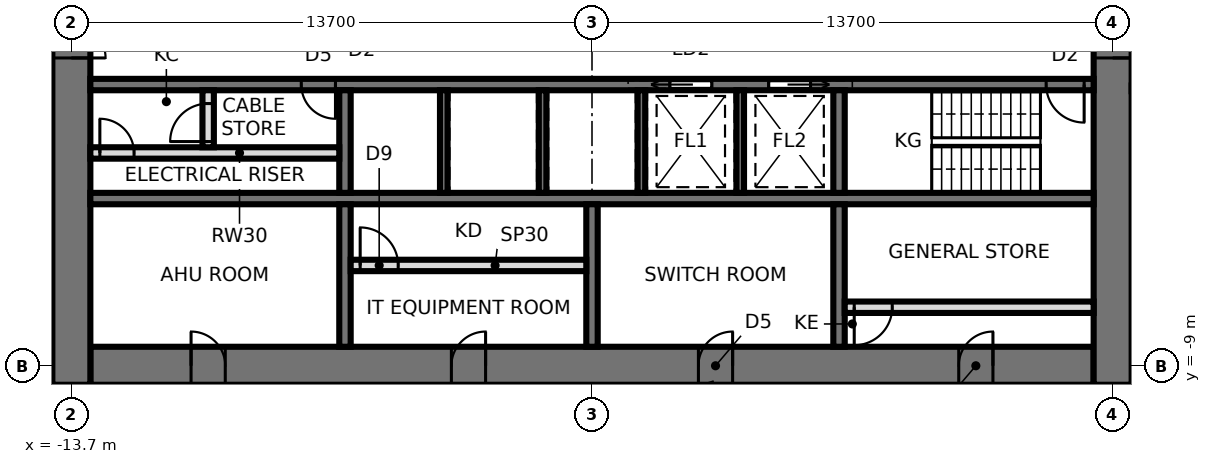
"""IFC4 building model, lengths in metres.
Left out: names, types, materials, properties, quantities, classifications, styles, units other than length and angle.
Written with IfcOpenShell. Run it as: python <this file> out.ifc"""

import sys

from ifc_helpers import new_model, si_unit, direction, frame, frame_2d, origin, place, context, subcontext, project, spatial, rectangle, extrude, element, fill, save


model = new_model("IFC4")
c1 = context("Model", 3, precision=1e-05, world=origin(), true_north=direction((0.0, 1.0)))
c2 = subcontext(c1, "Body", "Model", "MODEL_VIEW")
j1 = project(units=[si_unit("LENGTHUNIT", "METRE"), si_unit("PLANEANGLEUNIT", "RADIAN")], contexts=[c1])
p1 = place(None, origin())
s1 = spatial("IfcSite", under=j1, at=p1, CompositionType="ELEMENT")
p2 = place(p1, origin())
s2 = spatial("IfcBuilding", under=s1, at=p2, CompositionType="ELEMENT")
p3 = place(p2, frame((0.0, 0.0, 23.8)))
s3 = spatial("IfcBuildingStorey", under=s2, at=p3, CompositionType="ELEMENT", Elevation=23.8)
p4 = place(p3, frame((-13.2, -9.0, 0.0), z_axis=(0.0, 0.0, 1.0), x_axis=(1.0, 0.0, 0.0)))
e1 = element("IfcWall", 1, at=p4, inside=s3, PredefinedType="SHEAR", context=c2, shape_type="SweptSolid", body=[
    extrude(rectangle(XDim=26.4, YDim=1.0, at=frame_2d((13.2, 0.0))), origin(), (0.0, 0.0, 1.0), 4.2),
])
p5 = place(p4, frame((2.65, 0.0, 0.0)))
e2 = element("IfcOpeningElement", 2, at=p5, cuts=e1, PredefinedType="OPENING", context=c2, shape_type="SweptSolid", body=[
    extrude(rectangle(XDim=0.9, YDim=2.1, at=frame_2d((0.45, 1.05))), frame((0.0, 0.51, 0.0), z_axis=(0.0, -1.0, 0.0), x_axis=(1.0, 0.0, 0.0)), (0.0, 0.0, 1.0), 1.02),
])
p6 = place(p4, frame((9.5, 0.0, 0.0)))
e3 = element("IfcOpeningElement", 3, at=p6, cuts=e1, PredefinedType="OPENING", context=c2, shape_type="SweptSolid", body=[
    extrude(rectangle(XDim=0.9, YDim=2.1, at=frame_2d((0.45, 1.05))), frame((0.0, 0.51, 0.0), z_axis=(0.0, -1.0, 0.0), x_axis=(1.0, 0.0, 0.0)), (0.0, 0.0, 1.0), 1.02),
])
p7 = place(p4, frame((16.0, 0.0, 0.0)))
e4 = element("IfcOpeningElement", 4, at=p7, cuts=e1, PredefinedType="OPENING", context=c2, shape_type="SweptSolid", body=[
    extrude(rectangle(XDim=0.9, YDim=2.1, at=frame_2d((0.45, 1.05))), frame((0.0, 0.51, 0.0), z_axis=(0.0, -1.0, 0.0), x_axis=(1.0, 0.0, 0.0)), (0.0, 0.0, 1.0), 1.02),
])
p8 = place(p4, frame((22.85, 0.0, 0.0)))
e5 = element("IfcOpeningElement", 5, at=p8, cuts=e1, PredefinedType="OPENING", context=c2, shape_type="SweptSolid", body=[
    extrude(rectangle(XDim=0.9, YDim=2.1, at=frame_2d((0.45, 1.05))), frame((0.0, 0.51, 0.0), z_axis=(0.0, -1.0, 0.0), x_axis=(1.0, 0.0, 0.0)), (0.0, 0.0, 1.0), 1.02),
])
p9 = place(p3, frame((13.7, -9.5, 0.0), z_axis=(0.0, 0.0, 1.0), x_axis=(0.0, 1.0, 0.0)))
e6 = element("IfcWall", 6, at=p9, inside=s3, PredefinedType="SHEAR", context=c2, shape_type="SweptSolid", body=[
    extrude(rectangle(XDim=19.0, YDim=1.0, at=frame_2d((9.5, 0.0))), origin(), (0.0, 0.0, 1.0), 4.2),
])
p10 = place(p9, frame((8.6, 0.0, 0.0)))
e7 = element("IfcOpeningElement", 7, at=p10, cuts=e6, PredefinedType="OPENING", context=c2, shape_type="SweptSolid", body=[
    extrude(rectangle(XDim=1.8, YDim=2.4, at=frame_2d((0.9, 1.2))), frame((0.0, 0.51, 0.0), z_axis=(0.0, -1.0, 0.0), x_axis=(1.0, 0.0, 0.0)), (0.0, 0.0, 1.0), 1.02),
])
p11 = place(p3, frame((-13.7, 9.5, 0.0), z_axis=(0.0, 0.0, 1.0), x_axis=(0.0, -1.0, 0.0)))
e8 = element("IfcWall", 8, at=p11, inside=s3, PredefinedType="SHEAR", context=c2, shape_type="SweptSolid", body=[
    extrude(rectangle(XDim=19.0, YDim=1.0, at=frame_2d((9.5, 0.0))), origin(), (0.0, 0.0, 1.0), 4.2),
])
p12 = place(p11, frame((8.6, 0.0, 0.0)))
e9 = element("IfcOpeningElement", 9, at=p12, cuts=e8, PredefinedType="OPENING", context=c2, shape_type="SweptSolid", body=[
    extrude(rectangle(XDim=1.8, YDim=2.4, at=frame_2d((0.9, 1.2))), frame((0.0, 0.51, 0.0), z_axis=(0.0, -1.0, 0.0), x_axis=(1.0, 0.0, 0.0)), (0.0, 0.0, 1.0), 1.02),
])
p13 = place(p3, frame((-13.2, -1.6, 0.0), z_axis=(0.0, 0.0, 1.0), x_axis=(1.0, 0.0, 0.0)))
e10 = element("IfcWall", 10, at=p13, inside=s3, PredefinedType="SHEAR", context=c2, shape_type="SweptSolid", body=[
    extrude(rectangle(XDim=26.4, YDim=0.3, at=frame_2d((13.2, 0.0))), origin(), (0.0, 0.0, 1.0), 4.2),
])
p14 = place(p13, frame((25.15, 0.0, 0.0)))
e11 = element("IfcOpeningElement", 11, at=p14, cuts=e10, PredefinedType="OPENING", context=c2, shape_type="SweptSolid", body=[
    extrude(rectangle(XDim=1.0, YDim=2.1, at=frame_2d((0.5, 1.05))), frame((0.0, 0.16, 0.0), z_axis=(0.0, -1.0, 0.0), x_axis=(1.0, 0.0, 0.0)), (0.0, 0.0, 1.0), 0.32),
])
p15 = place(p13, frame((15.25, 0.0, 0.0)))
e12 = element("IfcOpeningElement", 12, at=p15, cuts=e10, PredefinedType="OPENING", context=c2, shape_type="SweptSolid", body=[
    extrude(rectangle(XDim=1.1, YDim=2.3, at=frame_2d((0.55, 1.15))), frame((0.0, 0.16, 0.0), z_axis=(0.0, -1.0, 0.0), x_axis=(1.0, 0.0, 0.0)), (0.0, 0.0, 1.0), 0.32),
])
p16 = place(p13, frame((17.85, 0.0, 0.0)))
e13 = element("IfcOpeningElement", 13, at=p16, cuts=e10, PredefinedType="OPENING", context=c2, shape_type="SweptSolid", body=[
    extrude(rectangle(XDim=1.1, YDim=2.3, at=frame_2d((0.55, 1.15))), frame((0.0, 0.16, 0.0), z_axis=(0.0, -1.0, 0.0), x_axis=(1.0, 0.0, 0.0)), (0.0, 0.0, 1.0), 0.32),
])
p17 = place(p13, frame((5.55, 0.0, 0.0)))
e14 = element("IfcOpeningElement", 14, at=p17, cuts=e10, PredefinedType="OPENING", context=c2, shape_type="SweptSolid", body=[
    extrude(rectangle(XDim=0.9, YDim=2.1, at=frame_2d((0.45, 1.05))), frame((0.0, 0.16, 0.0), z_axis=(0.0, -1.0, 0.0), x_axis=(1.0, 0.0, 0.0)), (0.0, 0.0, 1.0), 0.32),
])
p18 = place(p3, frame((-13.2, -4.6, 0.0), z_axis=(0.0, 0.0, 1.0), x_axis=(1.0, 0.0, 0.0)))
e15 = element("IfcWall", 15, at=p18, inside=s3, PredefinedType="SHEAR", context=c2, shape_type="SweptSolid", body=[
    extrude(rectangle(XDim=26.4, YDim=0.3, at=frame_2d((13.2, 0.0))), origin(), (0.0, 0.0, 1.0), 4.2),
])
p19 = place(p3, frame((-6.5, -1.75, 0.0), z_axis=(0.0, 0.0, 1.0), x_axis=(0.0, -1.0, 0.0)))
e16 = element("IfcWall", 16, at=p19, inside=s3, PredefinedType="SHEAR", context=c2, shape_type="SweptSolid", body=[
    extrude(rectangle(XDim=2.7, YDim=0.3, at=frame_2d((1.35, 0.0))), origin(), (0.0, 0.0, 1.0), 4.2),
])
p20 = place(p3, frame((-6.5, -4.75, 0.0), z_axis=(0.0, 0.0, 1.0), x_axis=(0.0, -1.0, 0.0)))
e17 = element("IfcWall", 17, at=p20, inside=s3, PredefinedType="SHEAR", context=c2, shape_type="SweptSolid", body=[
    extrude(rectangle(XDim=3.75, YDim=0.3, at=frame_2d((1.875, 0.0))), origin(), (0.0, 0.0, 1.0), 4.2),
])
p21 = place(p3, frame((6.5, -1.75, 0.0), z_axis=(0.0, 0.0, 1.0), x_axis=(0.0, -1.0, 0.0)))
e18 = element("IfcWall", 18, at=p21, inside=s3, PredefinedType="SHEAR", context=c2, shape_type="SweptSolid", body=[
    extrude(rectangle(XDim=2.7, YDim=0.3, at=frame_2d((1.35, 0.0))), origin(), (0.0, 0.0, 1.0), 4.2),
])
p22 = place(p3, frame((6.5, -4.75, 0.0), z_axis=(0.0, 0.0, 1.0), x_axis=(0.0, -1.0, 0.0)))
e19 = element("IfcWall", 19, at=p22, inside=s3, PredefinedType="SHEAR", context=c2, shape_type="SweptSolid", body=[
    extrude(rectangle(XDim=3.75, YDim=0.3, at=frame_2d((1.875, 0.0))), origin(), (0.0, 0.0, 1.0), 4.2),
])
for number, where, z_axis, x_axis in (
    (20, (-3.9, -1.75, 0.0), (0.0, 0.0, 1.0), (0.0, -1.0, 0.0)),
    (21, (-1.3, -1.75, 0.0), (0.0, 0.0, 1.0), (0.0, -1.0, 0.0)),
    (22, (1.3, -1.75, 0.0), (0.0, 0.0, 1.0), (0.0, -1.0, 0.0)),
    (23, (3.9, -1.75, 0.0), (0.0, 0.0, 1.0), (0.0, -1.0, 0.0)),
):
    element("IfcWall", number, at=place(p3, frame(where, z_axis=z_axis, x_axis=x_axis)), inside=s3, PredefinedType="SHEAR", context=c2, shape_type="SweptSolid", body=[
        extrude(rectangle(XDim=2.7, YDim=0.2, at=frame_2d((1.35, 0.0))), origin(), (0.0, 0.0, 1.0), 4.2),
    ])
p23 = place(p3, frame((0.0, -4.75, 0.0), z_axis=(0.0, 0.0, 1.0), x_axis=(0.0, -1.0, 0.0)))
e24 = element("IfcWall", 24, at=p23, inside=s3, PredefinedType="SHEAR", context=c2, shape_type="SweptSolid", body=[
    extrude(rectangle(XDim=3.75, YDim=0.3, at=frame_2d((1.875, 0.0))), origin(), (0.0, 0.0, 1.0), 4.2),
])
p24 = place(p3, frame((-6.35, -6.36, 0.0), z_axis=(0.0, 0.0, 1.0), x_axis=(1.0, 0.0, 0.0)))
e25 = element("IfcWall", 25, at=p24, inside=s3, PredefinedType="PARTITIONING", context=c2, shape_type="SweptSolid", body=[
    extrude(rectangle(XDim=6.2, YDim=0.3, at=frame_2d((3.1, 0.0))), origin(), (0.0, 0.0, 1.0), 4.04),
])
p25 = place(p24, frame((0.25, 0.0, 0.0)))
e26 = element("IfcOpeningElement", 26, at=p25, cuts=e25, PredefinedType="OPENING", context=c2, shape_type="SweptSolid", body=[
    extrude(rectangle(XDim=1.0, YDim=2.4, at=frame_2d((0.5, 1.2))), frame((0.0, 0.16, 0.0), z_axis=(0.0, -1.0, 0.0), x_axis=(1.0, 0.0, 0.0)), (0.0, 0.0, 1.0), 0.32),
])
p26 = place(p3, frame((6.65, -7.46, 0.0), z_axis=(0.0, 0.0, 1.0), x_axis=(1.0, 0.0, 0.0)))
e27 = element("IfcWall", 27, at=p26, inside=s3, PredefinedType="PARTITIONING", context=c2, shape_type="SweptSolid", body=[
    extrude(rectangle(XDim=6.55, YDim=0.3, at=frame_2d((3.275, 0.0))), origin(), (0.0, 0.0, 1.0), 4.04),
])
p27 = place(p26, frame((0.25, 0.0, 0.0)))
e28 = element("IfcOpeningElement", 28, at=p27, cuts=e27, PredefinedType="OPENING", context=c2, shape_type="SweptSolid", body=[
    extrude(rectangle(XDim=1.0, YDim=2.4, at=frame_2d((0.5, 1.2))), frame((0.0, 0.16, 0.0), z_axis=(0.0, -1.0, 0.0), x_axis=(1.0, 0.0, 0.0)), (0.0, 0.0, 1.0), 0.32),
])
p28 = place(p3, frame((-13.2, -3.4, 0.0), z_axis=(0.0, 0.0, 1.0), x_axis=(1.0, 0.0, 0.0)))
e29 = element("IfcWall", 29, at=p28, inside=s3, PredefinedType="SOLIDWALL", context=c2, shape_type="SweptSolid", body=[
    extrude(rectangle(XDim=6.55, YDim=0.3, at=frame_2d((3.275, 0.0))), origin(), (0.0, 0.0, 1.0), 4.04),
])
p29 = place(p28, frame((0.25, 0.0, 0.0)))
e30 = element("IfcOpeningElement", 30, at=p29, cuts=e29, PredefinedType="OPENING", context=c2, shape_type="SweptSolid", body=[
    extrude(rectangle(XDim=0.9, YDim=2.1, at=frame_2d((0.45, 1.05))), frame((0.0, 0.16, 0.0), z_axis=(0.0, -1.0, 0.0), x_axis=(1.0, 0.0, 0.0)), (0.0, 0.0, 1.0), 0.32),
])
p30 = place(p3, frame((-10.1, -3.25, 0.0), z_axis=(0.0, 0.0, 1.0), x_axis=(0.0, 1.0, 0.0)))
e31 = element("IfcWall", 31, at=p30, inside=s3, PredefinedType="PARTITIONING", context=c2, shape_type="SweptSolid", body=[
    extrude(rectangle(XDim=1.5, YDim=0.3, at=frame_2d((0.75, 0.0))), origin(), (0.0, 0.0, 1.0), 4.04),
])
p31 = place(p30, frame((0.15, 0.0, 0.0)))
e32 = element("IfcOpeningElement", 32, at=p31, cuts=e31, PredefinedType="OPENING", context=c2, shape_type="SweptSolid", body=[
    extrude(rectangle(XDim=1.0, YDim=2.4, at=frame_2d((0.5, 1.2))), frame((0.0, 0.16, 0.0), z_axis=(0.0, -1.0, 0.0), x_axis=(1.0, 0.0, 0.0)), (0.0, 0.0, 1.0), 0.32),
])
p32 = place(p3, frame((3.672, -11.3, 0.0), z_axis=(0.0, 0.0, 1.0), x_axis=(-0.309059822154, 0.95104259964, 0.0)))
e33 = element("IfcWall", 33, at=p32, inside=s3, PredefinedType="PARTITIONING", context=c2, shape_type="SweptSolid", body=[
    extrude(rectangle(XDim=1.893, YDim=0.12, at=frame_2d((0.946, 0.0))), origin(), (0.0, 0.0, 1.0), 2.84),
])
p33 = place(p12, origin())
e34 = element("IfcDoor", 34, at=p33, inside=s3, OperationType="DOUBLE_DOOR_SINGLE_SWING", PredefinedType="DOOR", context=c2, shape_type="SweptSolid", body=[
    extrude(rectangle(XDim=1.72, YDim=2.36, at=frame_2d((0.9, 1.18))), frame((0.0, 0.025, 0.0), z_axis=(0.0, -1.0, 0.0), x_axis=(1.0, 0.0, 0.0)), (0.0, 0.0, 1.0), 0.05),
    extrude(rectangle(XDim=0.04, YDim=2.4, at=frame_2d((0.02, 1.2))), frame((0.0, 0.25, 0.0), z_axis=(0.0, -1.0, 0.0), x_axis=(1.0, 0.0, 0.0)), (0.0, 0.0, 1.0), 0.5),
    extrude(rectangle(XDim=0.04, YDim=2.4, at=frame_2d((1.78, 1.2))), frame((0.0, 0.25, 0.0), z_axis=(0.0, -1.0, 0.0), x_axis=(1.0, 0.0, 0.0)), (0.0, 0.0, 1.0), 0.5),
    extrude(rectangle(XDim=1.72, YDim=0.04, at=frame_2d((0.9, 2.38))), frame((0.0, 0.25, 0.0), z_axis=(0.0, -1.0, 0.0), x_axis=(1.0, 0.0, 0.0)), (0.0, 0.0, 1.0), 0.5),
])
fill(e9, e34)
p34 = place(p10, frame((1.8, 0.0, 0.0), z_axis=(0.0, 0.0, 1.0), x_axis=(-1.0, 0.0, 0.0)))
e35 = element("IfcDoor", 35, at=p34, inside=s3, OperationType="DOUBLE_DOOR_SINGLE_SWING", PredefinedType="DOOR", context=c2, shape_type="SweptSolid", body=[
    extrude(rectangle(XDim=1.72, YDim=2.36, at=frame_2d((0.9, 1.18))), frame((0.0, 0.025, 0.0), z_axis=(0.0, -1.0, 0.0), x_axis=(1.0, 0.0, 0.0)), (0.0, 0.0, 1.0), 0.05),
    extrude(rectangle(XDim=0.04, YDim=2.4, at=frame_2d((1.78, 1.2))), frame((0.0, 0.25, 0.0), z_axis=(0.0, -1.0, 0.0), x_axis=(1.0, 0.0, 0.0)), (0.0, 0.0, 1.0), 0.5),
    extrude(rectangle(XDim=0.04, YDim=2.4, at=frame_2d((0.02, 1.2))), frame((0.0, 0.25, 0.0), z_axis=(0.0, -1.0, 0.0), x_axis=(1.0, 0.0, 0.0)), (0.0, 0.0, 1.0), 0.5),
    extrude(rectangle(XDim=1.72, YDim=0.04, at=frame_2d((0.9, 2.38))), frame((0.0, 0.25, 0.0), z_axis=(0.0, -1.0, 0.0), x_axis=(1.0, 0.0, 0.0)), (0.0, 0.0, 1.0), 0.5),
])
fill(e7, e35)
p35 = place(p14, frame((1.0, 0.0, 0.0), z_axis=(0.0, 0.0, 1.0), x_axis=(-1.0, 0.0, 0.0)))
e36 = element("IfcDoor", 36, at=p35, inside=s3, OperationType="SINGLE_SWING_LEFT", PredefinedType="DOOR", context=c2, shape_type="SweptSolid", body=[
    extrude(rectangle(XDim=1.0, YDim=2.1, at=frame_2d((0.5, 1.05))), frame((0.0, 0.025, 0.0), z_axis=(0.0, -1.0, 0.0), x_axis=(1.0, 0.0, 0.0)), (0.0, 0.0, 1.0), 0.05),
])
fill(e11, e36)
p36 = place(p15, frame((1.1, 0.0, 0.0), z_axis=(0.0, 0.0, 1.0), x_axis=(-1.0, 0.0, 0.0)))
e37 = element("IfcDoor", 37, at=p36, inside=s3, OperationType="SLIDING_TO_RIGHT", PredefinedType="DOOR", context=c2, shape_type="SweptSolid", body=[
    extrude(rectangle(XDim=1.1, YDim=2.3, at=frame_2d((0.55, 1.15))), frame((0.0, 0.025, 0.0), z_axis=(0.0, -1.0, 0.0), x_axis=(1.0, 0.0, 0.0)), (0.0, 0.0, 1.0), 0.05),
])
fill(e12, e37)
p37 = place(p16, frame((1.1, 0.0, 0.0), z_axis=(0.0, 0.0, 1.0), x_axis=(-1.0, 0.0, 0.0)))
e38 = element("IfcDoor", 38, at=p37, inside=s3, OperationType="SLIDING_TO_LEFT", PredefinedType="DOOR", context=c2, shape_type="SweptSolid", body=[
    extrude(rectangle(XDim=1.1, YDim=2.3, at=frame_2d((0.55, 1.15))), frame((0.0, 0.025, 0.0), z_axis=(0.0, -1.0, 0.0), x_axis=(1.0, 0.0, 0.0)), (0.0, 0.0, 1.0), 0.05),
])
fill(e13, e38)
p38 = place(p17, frame((0.9, 0.0, 0.0), z_axis=(0.0, 0.0, 1.0), x_axis=(-1.0, 0.0, 0.0)))
e39 = element("IfcDoor", 39, at=p38, inside=s3, OperationType="SINGLE_SWING_LEFT", PredefinedType="DOOR", context=c2, shape_type="SweptSolid", body=[
    extrude(rectangle(XDim=0.9, YDim=2.1, at=frame_2d((0.45, 1.05))), frame((0.0, 0.025, 0.0), z_axis=(0.0, -1.0, 0.0), x_axis=(1.0, 0.0, 0.0)), (0.0, 0.0, 1.0), 0.05),
])
fill(e14, e39)
p39 = place(p5, origin())
e40 = element("IfcDoor", 40, at=p39, inside=s3, OperationType="SINGLE_SWING_LEFT", PredefinedType="DOOR", context=c2, shape_type="SweptSolid", body=[
    extrude(rectangle(XDim=0.82, YDim=2.06, at=frame_2d((0.45, 1.03))), frame((0.0, 0.025, 0.0), z_axis=(0.0, -1.0, 0.0), x_axis=(1.0, 0.0, 0.0)), (0.0, 0.0, 1.0), 0.05),
    extrude(rectangle(XDim=0.04, YDim=2.1, at=frame_2d((0.02, 1.05))), frame((0.0, 0.25, 0.0), z_axis=(0.0, -1.0, 0.0), x_axis=(1.0, 0.0, 0.0)), (0.0, 0.0, 1.0), 0.5),
    extrude(rectangle(XDim=0.04, YDim=2.1, at=frame_2d((0.88, 1.05))), frame((0.0, 0.25, 0.0), z_axis=(0.0, -1.0, 0.0), x_axis=(1.0, 0.0, 0.0)), (0.0, 0.0, 1.0), 0.5),
    extrude(rectangle(XDim=0.82, YDim=0.04, at=frame_2d((0.45, 2.08))), frame((0.0, 0.25, 0.0), z_axis=(0.0, -1.0, 0.0), x_axis=(1.0, 0.0, 0.0)), (0.0, 0.0, 1.0), 0.5),
])
fill(e2, e40)
p40 = place(p6, origin())
e41 = element("IfcDoor", 41, at=p40, inside=s3, OperationType="SINGLE_SWING_RIGHT", PredefinedType="DOOR", context=c2, shape_type="SweptSolid", body=[
    extrude(rectangle(XDim=0.82, YDim=2.06, at=frame_2d((0.45, 1.03))), frame((0.0, 0.025, 0.0), z_axis=(0.0, -1.0, 0.0), x_axis=(1.0, 0.0, 0.0)), (0.0, 0.0, 1.0), 0.05),
    extrude(rectangle(XDim=0.04, YDim=2.1, at=frame_2d((0.02, 1.05))), frame((0.0, 0.25, 0.0), z_axis=(0.0, -1.0, 0.0), x_axis=(1.0, 0.0, 0.0)), (0.0, 0.0, 1.0), 0.5),
    extrude(rectangle(XDim=0.04, YDim=2.1, at=frame_2d((0.88, 1.05))), frame((0.0, 0.25, 0.0), z_axis=(0.0, -1.0, 0.0), x_axis=(1.0, 0.0, 0.0)), (0.0, 0.0, 1.0), 0.5),
    extrude(rectangle(XDim=0.82, YDim=0.04, at=frame_2d((0.45, 2.08))), frame((0.0, 0.25, 0.0), z_axis=(0.0, -1.0, 0.0), x_axis=(1.0, 0.0, 0.0)), (0.0, 0.0, 1.0), 0.5),
])
fill(e3, e41)
p41 = place(p7, origin())
e42 = element("IfcDoor", 42, at=p41, inside=s3, OperationType="SINGLE_SWING_RIGHT", PredefinedType="DOOR", context=c2, shape_type="SweptSolid", body=[
    extrude(rectangle(XDim=0.82, YDim=2.06, at=frame_2d((0.45, 1.03))), frame((0.0, 0.025, 0.0), z_axis=(0.0, -1.0, 0.0), x_axis=(1.0, 0.0, 0.0)), (0.0, 0.0, 1.0), 0.05),
    extrude(rectangle(XDim=0.04, YDim=2.1, at=frame_2d((0.02, 1.05))), frame((0.0, 0.25, 0.0), z_axis=(0.0, -1.0, 0.0), x_axis=(1.0, 0.0, 0.0)), (0.0, 0.0, 1.0), 0.5),
    extrude(rectangle(XDim=0.04, YDim=2.1, at=frame_2d((0.88, 1.05))), frame((0.0, 0.25, 0.0), z_axis=(0.0, -1.0, 0.0), x_axis=(1.0, 0.0, 0.0)), (0.0, 0.0, 1.0), 0.5),
    extrude(rectangle(XDim=0.82, YDim=0.04, at=frame_2d((0.45, 2.08))), frame((0.0, 0.25, 0.0), z_axis=(0.0, -1.0, 0.0), x_axis=(1.0, 0.0, 0.0)), (0.0, 0.0, 1.0), 0.5),
])
fill(e4, e42)
p42 = place(p8, origin())
e43 = element("IfcDoor", 43, at=p42, inside=s3, OperationType="SINGLE_SWING_RIGHT", PredefinedType="DOOR", context=c2, shape_type="SweptSolid", body=[
    extrude(rectangle(XDim=0.82, YDim=2.06, at=frame_2d((0.45, 1.03))), frame((0.0, 0.025, 0.0), z_axis=(0.0, -1.0, 0.0), x_axis=(1.0, 0.0, 0.0)), (0.0, 0.0, 1.0), 0.05),
    extrude(rectangle(XDim=0.04, YDim=2.1, at=frame_2d((0.02, 1.05))), frame((0.0, 0.25, 0.0), z_axis=(0.0, -1.0, 0.0), x_axis=(1.0, 0.0, 0.0)), (0.0, 0.0, 1.0), 0.5),
    extrude(rectangle(XDim=0.04, YDim=2.1, at=frame_2d((0.88, 1.05))), frame((0.0, 0.25, 0.0), z_axis=(0.0, -1.0, 0.0), x_axis=(1.0, 0.0, 0.0)), (0.0, 0.0, 1.0), 0.5),
    extrude(rectangle(XDim=0.82, YDim=0.04, at=frame_2d((0.45, 2.08))), frame((0.0, 0.25, 0.0), z_axis=(0.0, -1.0, 0.0), x_axis=(1.0, 0.0, 0.0)), (0.0, 0.0, 1.0), 0.5),
])
fill(e5, e43)
p43 = place(p25, origin())
e44 = element("IfcDoor", 44, at=p43, inside=s3, OperationType="SINGLE_SWING_LEFT", PredefinedType="DOOR", context=c2, shape_type="SweptSolid", body=[
    extrude(rectangle(XDim=1.0, YDim=2.4, at=frame_2d((0.5, 1.2))), frame((0.0, 0.025, 0.0), z_axis=(0.0, -1.0, 0.0), x_axis=(1.0, 0.0, 0.0)), (0.0, 0.0, 1.0), 0.05),
])
fill(e26, e44)
p44 = place(p27, frame((1.0, 0.0, 0.0), z_axis=(0.0, 0.0, 1.0), x_axis=(-1.0, 0.0, 0.0)))
e45 = element("IfcDoor", 45, at=p44, inside=s3, OperationType="SINGLE_SWING_RIGHT", PredefinedType="DOOR", context=c2, shape_type="SweptSolid", body=[
    extrude(rectangle(XDim=1.0, YDim=2.4, at=frame_2d((0.5, 1.2))), frame((0.0, 0.025, 0.0), z_axis=(0.0, -1.0, 0.0), x_axis=(1.0, 0.0, 0.0)), (0.0, 0.0, 1.0), 0.05),
])
fill(e28, e45)
p45 = place(p29, origin())
e46 = element("IfcDoor", 46, at=p45, inside=s3, OperationType="SINGLE_SWING_LEFT", PredefinedType="DOOR", context=c2, shape_type="SweptSolid", body=[
    extrude(rectangle(XDim=0.9, YDim=2.1, at=frame_2d((0.45, 1.05))), frame((0.0, 0.025, 0.0), z_axis=(0.0, -1.0, 0.0), x_axis=(1.0, 0.0, 0.0)), (0.0, 0.0, 1.0), 0.05),
])
fill(e30, e46)
p46 = place(p31, origin())
e47 = element("IfcDoor", 47, at=p46, inside=s3, OperationType="SINGLE_SWING_LEFT", PredefinedType="DOOR", context=c2, shape_type="SweptSolid", body=[
    extrude(rectangle(XDim=1.0, YDim=2.4, at=frame_2d((0.5, 1.2))), frame((0.0, 0.025, 0.0), z_axis=(0.0, -1.0, 0.0), x_axis=(1.0, 0.0, 0.0)), (0.0, 0.0, 1.0), 0.05),
])
fill(e32, e47)
save(model, sys.argv[1])
